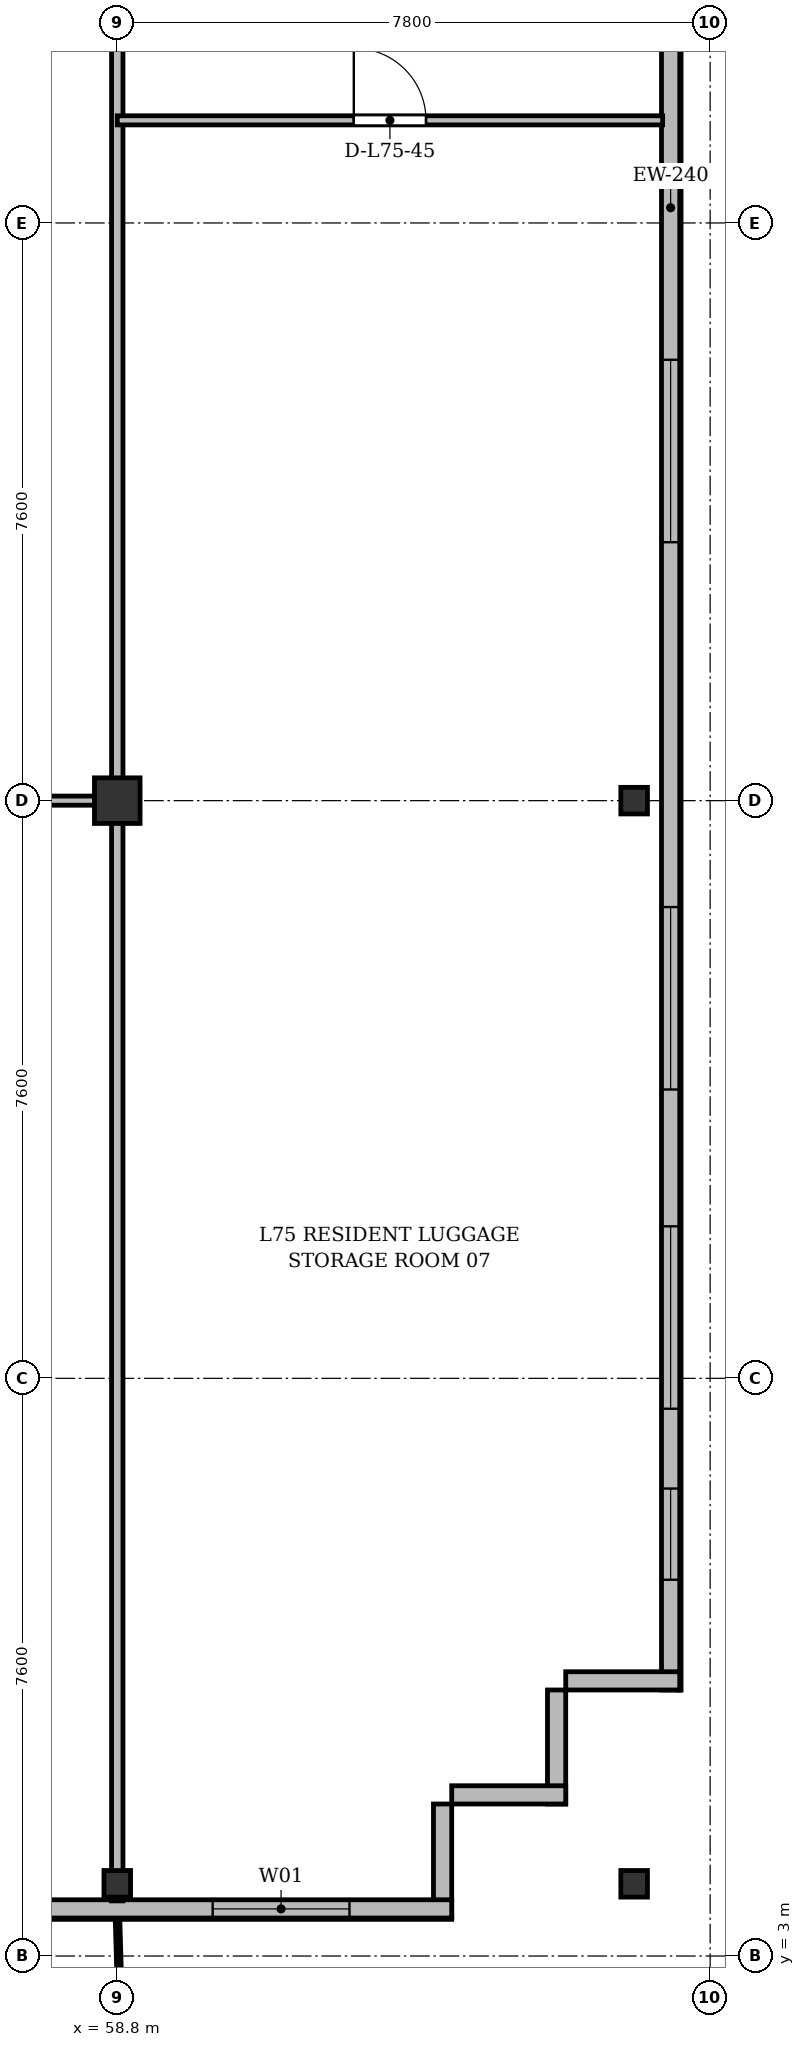
"""IFC4 building model, lengths in metres.
Left out: names, types, materials, properties, quantities, classifications, styles, units other than length and angle.
Written with IfcOpenShell. Run it as: python <this file> out.ifc"""

import sys

from ifc_helpers import new_model, si_unit, direction, frame, frame_2d, origin, origin_2d, place, context, subcontext, project, spatial, rectangle, i_section, extrude, source, transform, mapped, element, fill, save


model = new_model("IFC4")
c1 = context("Model", 3, precision=1e-05, world=origin(), true_north=direction((0.0, 1.0)))
c2 = subcontext(c1, "Body", "Model", "MODEL_VIEW")
j1 = project(units=[si_unit("LENGTHUNIT", "METRE"), si_unit("PLANEANGLEUNIT", "RADIAN")], contexts=[c1])
p1 = place(None, origin())
s1 = spatial("IfcSite", under=j1, at=p1, CompositionType="ELEMENT")
p2 = place(p1, origin())
s2 = spatial("IfcBuilding", under=s1, at=p2, CompositionType="ELEMENT")
p3 = place(p2, frame((0.0, 0.0, 288.3)))
s3 = spatial("IfcBuildingStorey", under=s2, at=p3, CompositionType="ELEMENT", Elevation=288.3)
m1 = source(origin(), c2, "Body", "SweptSolid", [
    extrude(i_section(OverallWidth=0.35, OverallDepth=0.35, WebThickness=0.018, FlangeThickness=0.028, at=origin_2d()), origin(), (0.0, 0.0, 1.0), 3.6),
])
p4 = place(p3, frame((58.8, 3.95, 0.0), z_axis=(0.0, 0.0, 1.0), x_axis=(1.0, 0.0, 0.0)))
e1 = element("IfcColumn", 1, at=p4, inside=s3, PredefinedType="COLUMN", context=c2, shape_type="MappedRepresentation", body=[
    mapped(m1, transform((0.0, 0.0, 0.0), x_axis=(1.0, 0.0, 0.0), y_axis=(0.0, 1.0, 0.0), z_axis=(0.0, 0.0, 1.0), scale=1.0)),
])
m2 = source(origin(), c2, "Body", "SweptSolid", [
    extrude(rectangle(XDim=0.6, YDim=0.6, at=origin_2d()), origin(), (0.0, 0.0, 1.0), 3.6),
])
p5 = place(p3, frame((58.8, 18.2, 0.0), z_axis=(0.0, 0.0, 1.0), x_axis=(1.0, 0.0, 0.0)))
e2 = element("IfcColumn", 2, at=p5, inside=s3, PredefinedType="COLUMN", context=c2, shape_type="MappedRepresentation", body=[
    mapped(m2, transform((0.0, 0.0, 0.0), x_axis=(1.0, 0.0, 0.0), y_axis=(0.0, 1.0, 0.0), z_axis=(0.0, 0.0, 1.0), scale=1.0)),
])
for number, where, z_axis, x_axis in (
    (3, (65.6, 3.95, 0.0), (0.0, 0.0, 1.0), (1.0, 0.0, 0.0)),
    (4, (65.6, 18.2, 0.0), (0.0, 0.0, 1.0), (1.0, 0.0, 0.0)),
):
    element("IfcColumn", number, at=place(p3, frame(where, z_axis=z_axis, x_axis=x_axis)), inside=s3, PredefinedType="COLUMN", context=c2, shape_type="MappedRepresentation", body=[
        mapped(m1, transform((0.0, 0.0, 0.0), x_axis=(1.0, 0.0, 0.0), y_axis=(0.0, 1.0, 0.0), z_axis=(0.0, 0.0, 1.0), scale=1.0)),
    ])
p6 = place(p3, frame((66.08, 45.5, 0.0), z_axis=(0.0, 0.0, 1.0), x_axis=(0.0, -1.0, 0.0)))
e5 = element("IfcWall", 5, at=p6, inside=s3, PredefinedType="SOLIDWALL", context=c2, shape_type="SweptSolid", body=[
    extrude(rectangle(XDim=39.0, YDim=0.24, at=frame_2d((19.5, 0.0))), origin(), (0.0, 0.0, 1.0), 3.37),
])
p7 = place(p6, frame((36.35, 0.0, 0.92)))
e6 = element("IfcOpeningElement", 6, at=p7, cuts=e5, PredefinedType="OPENING", context=c2, shape_type="SweptSolid", body=[
    extrude(rectangle(XDim=1.2, YDim=1.65, at=frame_2d((0.6, 0.825))), frame((0.0, 0.13, 0.0), z_axis=(0.0, -1.0, 0.0), x_axis=(1.0, 0.0, 0.0)), (0.0, 0.0, 1.0), 0.26),
])
p8 = place(p6, frame((32.9, 0.0, 0.92)))
e7 = element("IfcOpeningElement", 7, at=p8, cuts=e5, PredefinedType="OPENING", context=c2, shape_type="SweptSolid", body=[
    extrude(rectangle(XDim=2.4, YDim=2.1, at=frame_2d((1.2, 1.05))), frame((0.0, 0.13, 0.0), z_axis=(0.0, -1.0, 0.0), x_axis=(1.0, 0.0, 0.0)), (0.0, 0.0, 1.0), 0.26),
])
p9 = place(p6, frame((28.7, 0.0, 0.92)))
e8 = element("IfcOpeningElement", 8, at=p9, cuts=e5, PredefinedType="OPENING", context=c2, shape_type="SweptSolid", body=[
    extrude(rectangle(XDim=2.4, YDim=2.1, at=frame_2d((1.2, 1.05))), frame((0.0, 0.13, 0.0), z_axis=(0.0, -1.0, 0.0), x_axis=(1.0, 0.0, 0.0)), (0.0, 0.0, 1.0), 0.26),
])
p10 = place(p6, frame((21.5, 0.0, 0.92)))
e9 = element("IfcOpeningElement", 9, at=p10, cuts=e5, PredefinedType="OPENING", context=c2, shape_type="SweptSolid", body=[
    extrude(rectangle(XDim=2.4, YDim=2.1, at=frame_2d((1.2, 1.05))), frame((0.0, 0.13, 0.0), z_axis=(0.0, -1.0, 0.0), x_axis=(1.0, 0.0, 0.0)), (0.0, 0.0, 1.0), 0.26),
])
p11 = place(p6, frame((7.5, 0.0, 0.92)))
e10 = element("IfcOpeningElement", 10, at=p11, cuts=e5, PredefinedType="OPENING", context=c2, shape_type="SweptSolid", body=[
    extrude(rectangle(XDim=2.4, YDim=2.1, at=frame_2d((1.2, 1.05))), frame((0.0, 0.13, 0.0), z_axis=(0.0, -1.0, 0.0), x_axis=(1.0, 0.0, 0.0)), (0.0, 0.0, 1.0), 0.26),
])
p12 = place(p6, frame((4.5, 0.0, 0.92)))
e11 = element("IfcOpeningElement", 11, at=p12, cuts=e5, PredefinedType="OPENING", context=c2, shape_type="SweptSolid", body=[
    extrude(rectangle(XDim=1.2, YDim=1.65, at=frame_2d((0.6, 0.825))), frame((0.0, 0.13, 0.0), z_axis=(0.0, -1.0, 0.0), x_axis=(1.0, 0.0, 0.0)), (0.0, 0.0, 1.0), 0.26),
])
p13 = place(p6, frame((1.15, 0.0, 0.92)))
e12 = element("IfcOpeningElement", 12, at=p13, cuts=e5, PredefinedType="OPENING", context=c2, shape_type="SweptSolid", body=[
    extrude(rectangle(XDim=1.2, YDim=1.65, at=frame_2d((0.6, 0.825))), frame((0.0, 0.13, 0.0), z_axis=(0.0, -1.0, 0.0), x_axis=(1.0, 0.0, 0.0)), (0.0, 0.0, 1.0), 0.26),
])
p14 = place(p3, frame((66.2, 6.62, 0.0), z_axis=(0.0, 0.0, 1.0), x_axis=(-1.0, 0.0, 0.0)))
e13 = element("IfcWall", 13, at=p14, inside=s3, PredefinedType="SOLIDWALL", context=c2, shape_type="SweptSolid", body=[
    extrude(rectangle(XDim=1.5, YDim=0.24, at=frame_2d((0.75, 0.0))), origin(), (0.0, 0.0, 1.0), 2.87),
])
for number, where, z_axis, x_axis in (
    (14, (64.58, 6.5, 0.0), (0.0, 0.0, 1.0), (0.0, -1.0, 0.0)),
    (15, (64.7, 5.12, 0.0), (0.0, 0.0, 1.0), (-1.0, 0.0, 0.0)),
):
    element("IfcWall", number, at=place(p3, frame(where, z_axis=z_axis, x_axis=x_axis)), inside=s3, PredefinedType="SOLIDWALL", context=c2, shape_type="SweptSolid", body=[
        extrude(rectangle(XDim=1.5, YDim=0.24, at=frame_2d((0.75, 0.0))), origin(), (0.0, 0.0, 1.0), 3.37),
    ])
p15 = place(p3, frame((63.08, 5.0, 0.0), z_axis=(0.0, 0.0, 1.0), x_axis=(0.0, -1.0, 0.0)))
e16 = element("IfcWall", 16, at=p15, inside=s3, PredefinedType="SOLIDWALL", context=c2, shape_type="SweptSolid", body=[
    extrude(rectangle(XDim=1.5, YDim=0.24, at=frame_2d((0.75, 0.0))), origin(), (0.0, 0.0, 1.0), 2.92),
])
p16 = place(p3, frame((63.2, 3.62, 0.0), z_axis=(0.0, 0.0, 1.0), x_axis=(-1.0, 0.0, 0.0)))
e17 = element("IfcWall", 17, at=p16, inside=s3, PredefinedType="SOLIDWALL", context=c2, shape_type="SweptSolid", body=[
    extrude(rectangle(XDim=20.2, YDim=0.24, at=frame_2d((10.1, 0.0))), origin(), (0.0, 0.0, 1.0), 3.37),
])
p17 = place(p16, frame((1.345, 0.0, 0.9)))
e18 = element("IfcOpeningElement", 18, at=p17, cuts=e17, PredefinedType="OPENING", context=c2, shape_type="SweptSolid", body=[
    extrude(rectangle(XDim=1.8, YDim=1.8, at=frame_2d((0.9, 0.9))), frame((0.0, 0.13, 0.0), z_axis=(0.0, -1.0, 0.0), x_axis=(1.0, 0.0, 0.0)), (0.0, 0.0, 1.0), 0.26),
])
p18 = place(p16, frame((7.2, 0.0, 0.9)))
e19 = element("IfcOpeningElement", 19, at=p18, cuts=e17, PredefinedType="OPENING", context=c2, shape_type="SweptSolid", body=[
    extrude(rectangle(XDim=2.2, YDim=1.8, at=frame_2d((1.1, 0.9))), frame((0.0, 0.13, 0.0), z_axis=(0.0, -1.0, 0.0), x_axis=(1.0, 0.0, 0.0)), (0.0, 0.0, 1.0), 0.26),
])
p19 = place(p16, frame((13.864, 0.0, 0.0)))
e20 = element("IfcOpeningElement", 20, at=p19, cuts=e17, PredefinedType="OPENING", context=c2, shape_type="SweptSolid", body=[
    extrude(rectangle(XDim=1.2, YDim=2.2, at=frame_2d((0.6, 1.1))), frame((0.0, 0.13, 0.0), z_axis=(0.0, -1.0, 0.0), x_axis=(1.0, 0.0, 0.0)), (0.0, 0.0, 1.0), 0.26),
])
p20 = place(p16, frame((16.6, 0.0, 0.9)))
e21 = element("IfcOpeningElement", 21, at=p20, cuts=e17, PredefinedType="OPENING", context=c2, shape_type="SweptSolid", body=[
    extrude(rectangle(XDim=2.0, YDim=1.95, at=frame_2d((1.0, 0.975))), frame((0.0, 0.13, 0.0), z_axis=(0.0, -1.0, 0.0), x_axis=(1.0, 0.0, 0.0)), (0.0, 0.0, 1.0), 0.26),
])
p21 = place(p3, frame((58.8, 3.725, 0.0), z_axis=(0.0, 0.0, 1.0), x_axis=(0.0, 1.0, 0.0)))
e22 = element("IfcWall", 22, at=p21, inside=s3, PredefinedType="PARTITIONING", context=c2, shape_type="SweptSolid", body=[
    extrude(rectangle(XDim=27.275, YDim=0.15, at=frame_2d((13.637, 0.0))), origin(), (0.0, 0.0, 1.0), 2.87),
])
p22 = place(p3, frame((51.0, 18.2, 0.0), z_axis=(0.0, 0.0, 1.0), x_axis=(1.0, 0.0, 0.0)))
e23 = element("IfcWall", 23, at=p22, inside=s3, PredefinedType="PARTITIONING", context=c2, shape_type="SweptSolid", body=[
    extrude(rectangle(XDim=7.8, YDim=0.12, at=frame_2d((3.9, 0.0))), origin(), (0.0, 0.0, 1.0), 2.92),
])
p23 = place(p22, frame((3.333, 0.0, 0.0)))
e24 = element("IfcOpeningElement", 24, at=p23, cuts=e23, PredefinedType="OPENING", context=c2, shape_type="SweptSolid", body=[
    extrude(rectangle(XDim=0.95, YDim=2.15, at=frame_2d((0.475, 1.075))), frame((0.0, 0.07, 0.0), z_axis=(0.0, -1.0, 0.0), x_axis=(1.0, 0.0, 0.0)), (0.0, 0.0, 1.0), 0.14),
])
p24 = place(p3, frame((58.8, 27.15, 0.0), z_axis=(0.0, 0.0, 1.0), x_axis=(1.0, 0.0, 0.0)))
e25 = element("IfcWall", 25, at=p24, inside=s3, PredefinedType="PARTITIONING", context=c2, shape_type="SweptSolid", body=[
    extrude(rectangle(XDim=7.175, YDim=0.12, at=frame_2d((3.587, 0.0))), origin(), (0.0, 0.0, 1.0), 2.87),
])
p25 = place(p24, frame((3.112, 0.0, 0.0)))
e26 = element("IfcOpeningElement", 26, at=p25, cuts=e25, PredefinedType="OPENING", context=c2, shape_type="SweptSolid", body=[
    extrude(rectangle(XDim=0.95, YDim=2.15, at=frame_2d((0.475, 1.075))), frame((0.0, 0.07, 0.0), z_axis=(0.0, -1.0, 0.0), x_axis=(1.0, 0.0, 0.0)), (0.0, 0.0, 1.0), 0.14),
])
m3 = source(origin(), c2, "Body", "SweptSolid", [
    extrude(rectangle(XDim=1.2, YDim=1.65, at=frame_2d((0.6, 0.825))), frame((0.0, 0.03, 0.0), z_axis=(0.0, -1.0, 0.0), x_axis=(1.0, 0.0, 0.0)), (0.0, 0.0, 1.0), 0.06),
])
p26 = place(p7, origin())
e27 = element("IfcWindow", 27, at=p26, inside=s3, PartitioningType="SINGLE_PANEL", PredefinedType="WINDOW", context=c2, shape_type="MappedRepresentation", body=[
    mapped(m3, transform((0.0, 0.0, 0.0), x_axis=(1.0, 0.0, 0.0), y_axis=(0.0, 1.0, 0.0), z_axis=(0.0, 0.0, 1.0), scale=1.0)),
])
fill(e6, e27)
m4 = source(origin(), c2, "Body", "SweptSolid", [
    extrude(rectangle(XDim=2.4, YDim=2.1, at=frame_2d((1.2, 1.05))), frame((0.0, 0.03, 0.0), z_axis=(0.0, -1.0, 0.0), x_axis=(1.0, 0.0, 0.0)), (0.0, 0.0, 1.0), 0.06),
])
p27 = place(p8, origin())
e28 = element("IfcWindow", 28, at=p27, inside=s3, PartitioningType="SINGLE_PANEL", PredefinedType="WINDOW", context=c2, shape_type="MappedRepresentation", body=[
    mapped(m4, transform((0.0, 0.0, 0.0), x_axis=(1.0, 0.0, 0.0), y_axis=(0.0, 1.0, 0.0), z_axis=(0.0, 0.0, 1.0), scale=1.0)),
])
fill(e7, e28)
p28 = place(p9, origin())
e29 = element("IfcWindow", 29, at=p28, inside=s3, PartitioningType="SINGLE_PANEL", PredefinedType="WINDOW", context=c2, shape_type="MappedRepresentation", body=[
    mapped(m4, transform((0.0, 0.0, 0.0), x_axis=(1.0, 0.0, 0.0), y_axis=(0.0, 1.0, 0.0), z_axis=(0.0, 0.0, 1.0), scale=1.0)),
])
fill(e8, e29)
p29 = place(p10, origin())
e30 = element("IfcWindow", 30, at=p29, inside=s3, PartitioningType="SINGLE_PANEL", PredefinedType="WINDOW", context=c2, shape_type="MappedRepresentation", body=[
    mapped(m4, transform((0.0, 0.0, 0.0), x_axis=(1.0, 0.0, 0.0), y_axis=(0.0, 1.0, 0.0), z_axis=(0.0, 0.0, 1.0), scale=1.0)),
])
fill(e9, e30)
m5 = source(origin(), c2, "Body", "SweptSolid", [
    extrude(rectangle(XDim=1.8, YDim=1.8, at=frame_2d((0.9, 0.9))), frame((0.0, 0.03, 0.0), z_axis=(0.0, -1.0, 0.0), x_axis=(1.0, 0.0, 0.0)), (0.0, 0.0, 1.0), 0.06),
])
p30 = place(p17, origin())
e31 = element("IfcWindow", 31, at=p30, inside=s3, PartitioningType="SINGLE_PANEL", PredefinedType="WINDOW", context=c2, shape_type="MappedRepresentation", body=[
    mapped(m5, transform((0.0, 0.0, 0.0), x_axis=(1.0, 0.0, 0.0), y_axis=(0.0, 1.0, 0.0), z_axis=(0.0, 0.0, 1.0), scale=1.0)),
])
fill(e18, e31)
m6 = source(origin(), c2, "Body", "SweptSolid", [
    extrude(rectangle(XDim=0.95, YDim=2.15, at=frame_2d((0.475, 1.075))), frame((0.0, 0.025, 0.0), z_axis=(0.0, -1.0, 0.0), x_axis=(1.0, 0.0, 0.0)), (0.0, 0.0, 1.0), 0.05),
])
p31 = place(p25, origin())
e32 = element("IfcDoor", 32, at=p31, inside=s3, OperationType="SINGLE_SWING_LEFT", PredefinedType="DOOR", context=c2, shape_type="MappedRepresentation", body=[
    mapped(m6, transform((0.0, 0.0, 0.0), x_axis=(1.0, 0.0, 0.0), y_axis=(0.0, 1.0, 0.0), z_axis=(0.0, 0.0, 1.0), scale=1.0)),
])
fill(e26, e32)
save(model, sys.argv[1])
